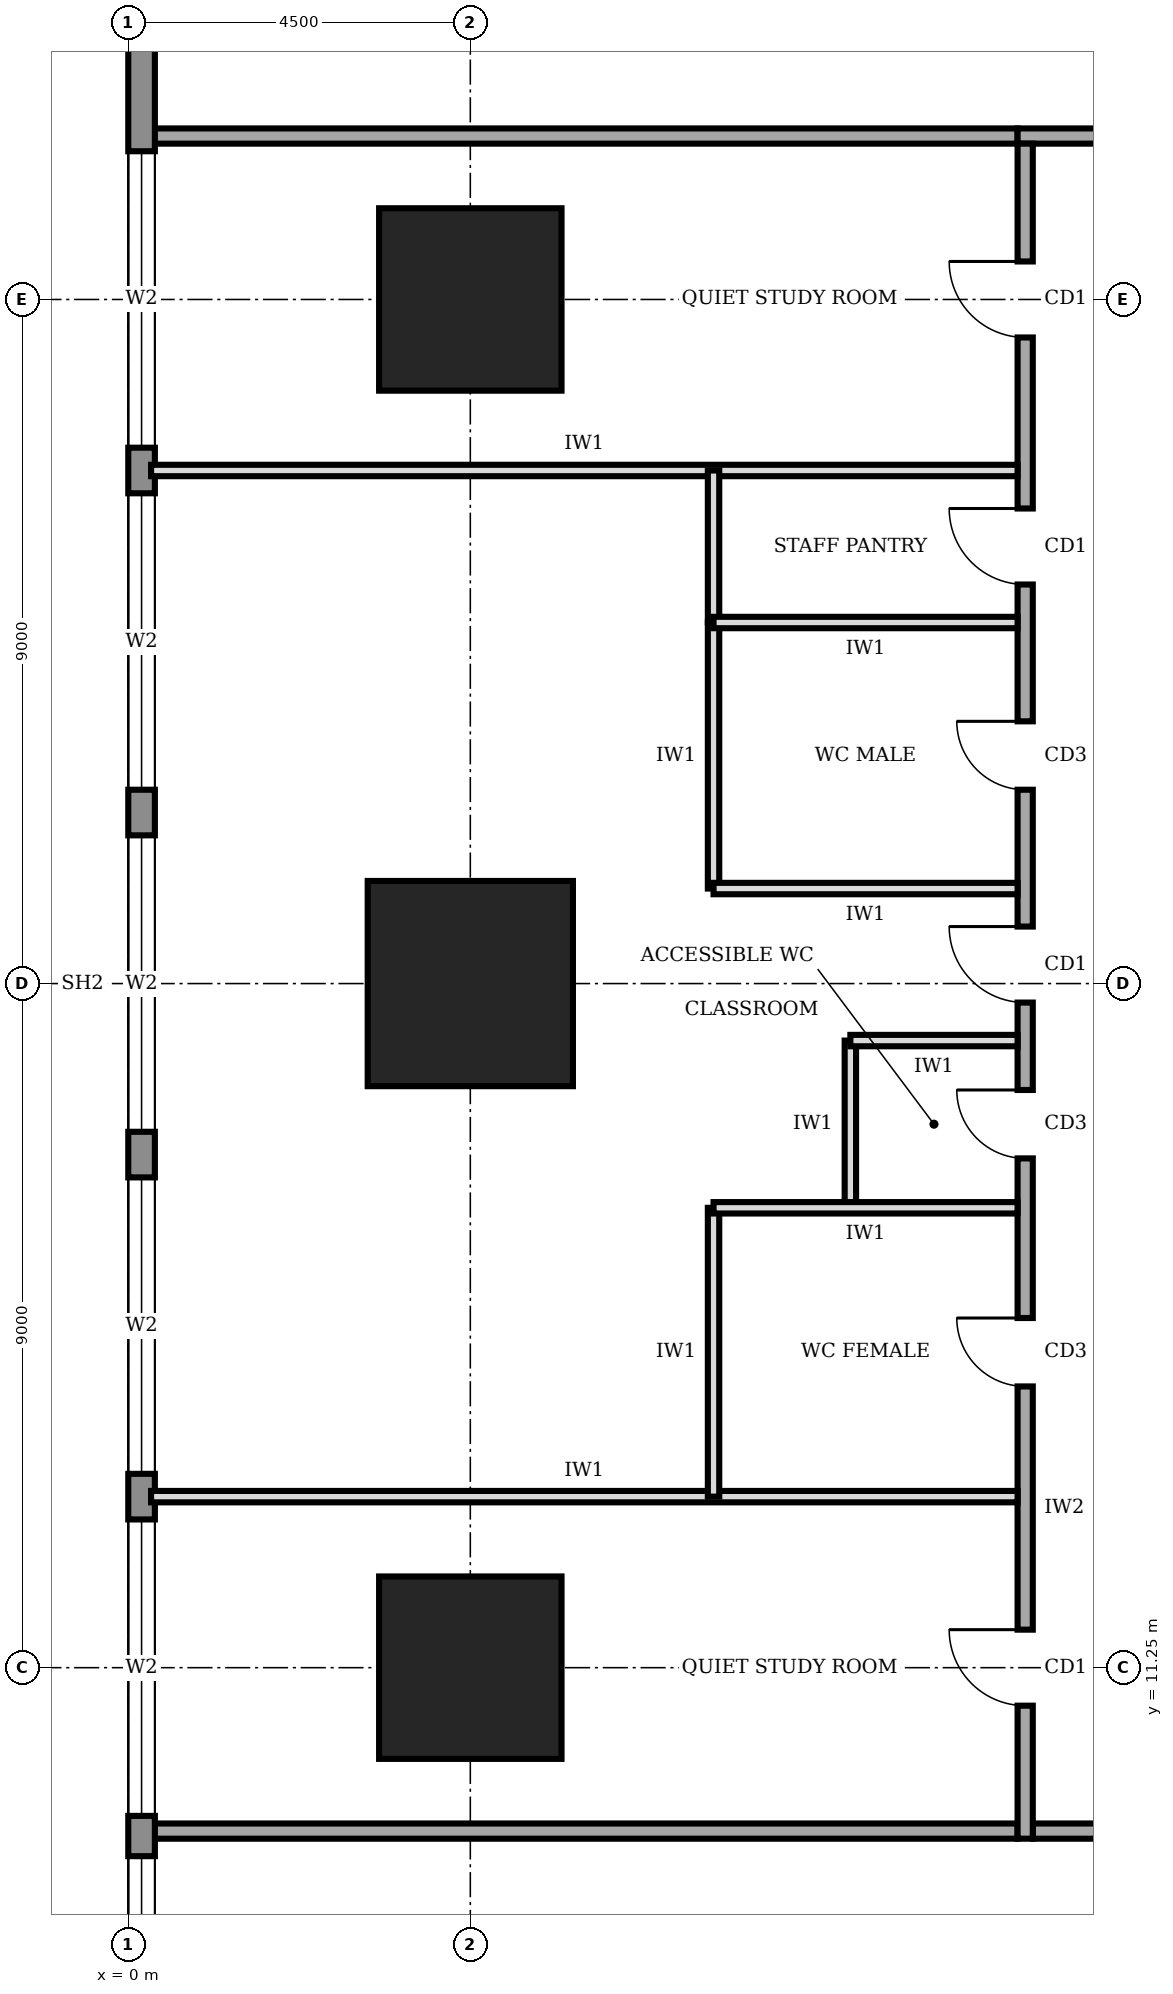
"""IFC4 building model, lengths in metres.
Left out: names, types, materials, properties, quantities, classifications, styles, units other than length and angle.
Written with IfcOpenShell. Run it as: python <this file> out.ifc"""

import sys

from ifc_helpers import new_model, si_unit, direction, frame, frame_2d, origin, origin_2d, place, context, subcontext, project, spatial, rectangle, extrude, element, fill, save


model = new_model("IFC4")
c1 = context("Model", 3, precision=1e-05, world=origin(), true_north=direction((0.0, 1.0)))
c2 = subcontext(c1, "Body", "Model", "MODEL_VIEW")
j1 = project(units=[si_unit("LENGTHUNIT", "METRE"), si_unit("PLANEANGLEUNIT", "RADIAN")], contexts=[c1])
p1 = place(None, origin())
s1 = spatial("IfcSite", under=j1, at=p1, CompositionType="ELEMENT")
p2 = place(p1, origin())
s2 = spatial("IfcBuilding", under=s1, at=p2, CompositionType="ELEMENT")
p3 = place(p2, frame((0.0, 0.0, 69.0)))
s3 = spatial("IfcBuildingStorey", under=s2, at=p3, CompositionType="ELEMENT", Elevation=69.0)
p4 = place(p3, frame((4.5, 11.25, 0.0), z_axis=(0.0, 0.0, 1.0), x_axis=(1.0, 0.0, 0.0)))
e1 = element("IfcColumn", 1, at=p4, inside=s3, PredefinedType="COLUMN", context=c2, shape_type="SweptSolid", body=[
    extrude(rectangle(XDim=2.4, YDim=2.4, at=origin_2d()), origin(), (0.0, 0.0, 1.0), 4.0),
])
p5 = place(p3, frame((4.5, 20.25, 0.0), z_axis=(0.0, 0.0, 1.0), x_axis=(1.0, 0.0, 0.0)))
e2 = element("IfcColumn", 2, at=p5, inside=s3, PredefinedType="COLUMN", context=c2, shape_type="SweptSolid", body=[
    extrude(rectangle(XDim=2.7, YDim=2.7, at=origin_2d()), origin(), (0.0, 0.0, 1.0), 4.0),
])
p6 = place(p3, frame((4.5, 29.25, 0.0), z_axis=(0.0, 0.0, 1.0), x_axis=(1.0, 0.0, 0.0)))
e3 = element("IfcColumn", 3, at=p6, inside=s3, PredefinedType="COLUMN", context=c2, shape_type="SweptSolid", body=[
    extrude(rectangle(XDim=2.4, YDim=2.4, at=origin_2d()), origin(), (0.0, 0.0, 1.0), 4.0),
])
p7 = place(p3, frame((0.175, 35.98, 0.0), z_axis=(0.0, 0.0, 1.0), x_axis=(0.0, -1.0, 0.0)))
e4 = element("IfcWall", 4, at=p7, inside=s3, PredefinedType="STANDARD", context=c2, shape_type="SweptSolid", body=[
    extrude(rectangle(XDim=31.46, YDim=0.35, at=frame_2d((15.73, 0.0))), origin(), (0.0, 0.0, 1.0), 3.75),
])
p8 = place(p7, frame((27.21, 0.0, 0.6)))
e5 = element("IfcOpeningElement", 5, at=p8, cuts=e4, PredefinedType="OPENING", context=c2, shape_type="SweptSolid", body=[
    extrude(rectangle(XDim=3.9, YDim=2.6, at=frame_2d((1.95, 1.3))), frame((0.0, 0.185, 0.0), z_axis=(0.0, -1.0, 0.0), x_axis=(1.0, 0.0, 0.0)), (0.0, 0.0, 1.0), 0.37),
])
p9 = place(p7, frame((22.78, 0.0, 0.6)))
e6 = element("IfcOpeningElement", 6, at=p9, cuts=e4, PredefinedType="OPENING", context=c2, shape_type="SweptSolid", body=[
    extrude(rectangle(XDim=3.9, YDim=2.6, at=frame_2d((1.95, 1.3))), frame((0.0, 0.185, 0.0), z_axis=(0.0, -1.0, 0.0), x_axis=(1.0, 0.0, 0.0)), (0.0, 0.0, 1.0), 0.37),
])
p10 = place(p7, frame((18.28, 0.0, 0.6)))
e7 = element("IfcOpeningElement", 7, at=p10, cuts=e4, PredefinedType="OPENING", context=c2, shape_type="SweptSolid", body=[
    extrude(rectangle(XDim=3.9, YDim=2.6, at=frame_2d((1.95, 1.3))), frame((0.0, 0.185, 0.0), z_axis=(0.0, -1.0, 0.0), x_axis=(1.0, 0.0, 0.0)), (0.0, 0.0, 1.0), 0.37),
])
p11 = place(p7, frame((13.78, 0.0, 0.6)))
e8 = element("IfcOpeningElement", 8, at=p11, cuts=e4, PredefinedType="OPENING", context=c2, shape_type="SweptSolid", body=[
    extrude(rectangle(XDim=3.9, YDim=2.6, at=frame_2d((1.95, 1.3))), frame((0.0, 0.185, 0.0), z_axis=(0.0, -1.0, 0.0), x_axis=(1.0, 0.0, 0.0)), (0.0, 0.0, 1.0), 0.37),
])
p12 = place(p7, frame((9.28, 0.0, 0.6)))
e9 = element("IfcOpeningElement", 9, at=p12, cuts=e4, PredefinedType="OPENING", context=c2, shape_type="SweptSolid", body=[
    extrude(rectangle(XDim=3.9, YDim=2.6, at=frame_2d((1.95, 1.3))), frame((0.0, 0.185, 0.0), z_axis=(0.0, -1.0, 0.0), x_axis=(1.0, 0.0, 0.0)), (0.0, 0.0, 1.0), 0.37),
])
p13 = place(p7, frame((4.78, 0.0, 0.6)))
e10 = element("IfcOpeningElement", 10, at=p13, cuts=e4, PredefinedType="OPENING", context=c2, shape_type="SweptSolid", body=[
    extrude(rectangle(XDim=3.9, YDim=2.6, at=frame_2d((1.95, 1.3))), frame((0.0, 0.185, 0.0), z_axis=(0.0, -1.0, 0.0), x_axis=(1.0, 0.0, 0.0)), (0.0, 0.0, 1.0), 0.37),
])
p14 = place(p3, frame((11.9, 9.1, 0.0), z_axis=(0.0, 0.0, 1.0), x_axis=(1.0, 0.0, 0.0)))
e11 = element("IfcWall", 11, at=p14, inside=s3, PredefinedType="SOLIDWALL", context=c2, shape_type="SweptSolid", body=[
    extrude(rectangle(XDim=18.4, YDim=0.2, at=frame_2d((9.2, 0.0))), origin(), (0.0, 0.0, 1.0), 3.75),
])
p15 = place(p14, frame((2.25, 0.0, 0.0)))
e12 = element("IfcOpeningElement", 12, at=p15, cuts=e11, PredefinedType="OPENING", context=c2, shape_type="SweptSolid", body=[
    extrude(rectangle(XDim=1.4, YDim=2.1, at=frame_2d((0.7, 1.05))), frame((0.0, 0.11, 0.0), z_axis=(0.0, -1.0, 0.0), x_axis=(1.0, 0.0, 0.0)), (0.0, 0.0, 1.0), 0.22),
])
p16 = place(p14, frame((7.85, 0.0, 0.0)))
e13 = element("IfcOpeningElement", 13, at=p16, cuts=e11, PredefinedType="OPENING", context=c2, shape_type="SweptSolid", body=[
    extrude(rectangle(XDim=1.0, YDim=2.1, at=frame_2d((0.5, 1.05))), frame((0.0, 0.11, 0.0), z_axis=(0.0, -1.0, 0.0), x_axis=(1.0, 0.0, 0.0)), (0.0, 0.0, 1.0), 0.22),
])
p17 = place(p14, frame((13.8, 0.0, 0.0)))
e14 = element("IfcOpeningElement", 14, at=p17, cuts=e11, PredefinedType="OPENING", context=c2, shape_type="SweptSolid", body=[
    extrude(rectangle(XDim=1.4, YDim=2.1, at=frame_2d((0.7, 1.05))), frame((0.0, 0.11, 0.0), z_axis=(0.0, -1.0, 0.0), x_axis=(1.0, 0.0, 0.0)), (0.0, 0.0, 1.0), 0.22),
])
p18 = place(p3, frame((30.1, 31.4, 0.0), z_axis=(0.0, 0.0, 1.0), x_axis=(-1.0, 0.0, 0.0)))
e15 = element("IfcWall", 15, at=p18, inside=s3, PredefinedType="SOLIDWALL", context=c2, shape_type="SweptSolid", body=[
    extrude(rectangle(XDim=18.4, YDim=0.2, at=frame_2d((9.2, 0.0))), origin(), (0.0, 0.0, 1.0), 3.75),
])
p19 = place(p18, frame((14.55, 0.0, 0.0)))
e16 = element("IfcOpeningElement", 16, at=p19, cuts=e15, PredefinedType="OPENING", context=c2, shape_type="SweptSolid", body=[
    extrude(rectangle(XDim=1.4, YDim=2.1, at=frame_2d((0.7, 1.05))), frame((0.0, 0.11, 0.0), z_axis=(0.0, -1.0, 0.0), x_axis=(1.0, 0.0, 0.0)), (0.0, 0.0, 1.0), 0.22),
])
p20 = place(p18, frame((7.1, 0.0, 0.0)))
e17 = element("IfcOpeningElement", 17, at=p20, cuts=e15, PredefinedType="OPENING", context=c2, shape_type="SweptSolid", body=[
    extrude(rectangle(XDim=1.0, YDim=2.1, at=frame_2d((0.5, 1.05))), frame((0.0, 0.11, 0.0), z_axis=(0.0, -1.0, 0.0), x_axis=(1.0, 0.0, 0.0)), (0.0, 0.0, 1.0), 0.22),
])
p21 = place(p18, frame((0.55, 0.0, 0.0)))
e18 = element("IfcOpeningElement", 18, at=p21, cuts=e15, PredefinedType="OPENING", context=c2, shape_type="SweptSolid", body=[
    extrude(rectangle(XDim=1.8, YDim=2.1, at=frame_2d((0.9, 1.05))), frame((0.0, 0.11, 0.0), z_axis=(0.0, -1.0, 0.0), x_axis=(1.0, 0.0, 0.0)), (0.0, 0.0, 1.0), 0.22),
])
p22 = place(p3, frame((11.8, 31.3, 0.0), z_axis=(0.0, 0.0, 1.0), x_axis=(0.0, -1.0, 0.0)))
e19 = element("IfcWall", 19, at=p22, inside=s3, PredefinedType="SOLIDWALL", context=c2, shape_type="SweptSolid", body=[
    extrude(rectangle(XDim=22.3, YDim=0.2, at=frame_2d((11.15, 0.0))), origin(), (0.0, 0.0, 1.0), 3.75),
])
p23 = place(p22, frame((19.55, 0.0, 0.0)))
e20 = element("IfcOpeningElement", 20, at=p23, cuts=e19, PredefinedType="OPENING", context=c2, shape_type="SweptSolid", body=[
    extrude(rectangle(XDim=1.0, YDim=2.1, at=frame_2d((0.5, 1.05))), frame((0.0, 0.11, 0.0), z_axis=(0.0, -1.0, 0.0), x_axis=(1.0, 0.0, 0.0)), (0.0, 0.0, 1.0), 0.22),
])
p24 = place(p22, frame((15.45, 0.0, 0.0)))
e21 = element("IfcOpeningElement", 21, at=p24, cuts=e19, PredefinedType="OPENING", context=c2, shape_type="SweptSolid", body=[
    extrude(rectangle(XDim=0.9, YDim=2.1, at=frame_2d((0.45, 1.05))), frame((0.0, 0.11, 0.0), z_axis=(0.0, -1.0, 0.0), x_axis=(1.0, 0.0, 0.0)), (0.0, 0.0, 1.0), 0.22),
])
p25 = place(p22, frame((12.45, 0.0, 0.0)))
e22 = element("IfcOpeningElement", 22, at=p25, cuts=e19, PredefinedType="OPENING", context=c2, shape_type="SweptSolid", body=[
    extrude(rectangle(XDim=0.9, YDim=2.1, at=frame_2d((0.45, 1.05))), frame((0.0, 0.11, 0.0), z_axis=(0.0, -1.0, 0.0), x_axis=(1.0, 0.0, 0.0)), (0.0, 0.0, 1.0), 0.22),
])
p26 = place(p22, frame((7.6, 0.0, 0.0)))
e23 = element("IfcOpeningElement", 23, at=p26, cuts=e19, PredefinedType="OPENING", context=c2, shape_type="SweptSolid", body=[
    extrude(rectangle(XDim=0.9, YDim=2.1, at=frame_2d((0.45, 1.05))), frame((0.0, 0.11, 0.0), z_axis=(0.0, -1.0, 0.0), x_axis=(1.0, 0.0, 0.0)), (0.0, 0.0, 1.0), 0.22),
])
p27 = place(p22, frame((4.8, 0.0, 0.0)))
e24 = element("IfcOpeningElement", 24, at=p27, cuts=e19, PredefinedType="OPENING", context=c2, shape_type="SweptSolid", body=[
    extrude(rectangle(XDim=1.0, YDim=2.1, at=frame_2d((0.5, 1.05))), frame((0.0, 0.11, 0.0), z_axis=(0.0, -1.0, 0.0), x_axis=(1.0, 0.0, 0.0)), (0.0, 0.0, 1.0), 0.22),
])
p28 = place(p22, frame((10.3, 0.0, 0.0)))
e25 = element("IfcOpeningElement", 25, at=p28, cuts=e19, PredefinedType="OPENING", context=c2, shape_type="SweptSolid", body=[
    extrude(rectangle(XDim=1.0, YDim=2.1, at=frame_2d((0.5, 1.05))), frame((0.0, 0.11, 0.0), z_axis=(0.0, -1.0, 0.0), x_axis=(1.0, 0.0, 0.0)), (0.0, 0.0, 1.0), 0.22),
])
p29 = place(p22, frame((1.55, 0.0, 0.0)))
e26 = element("IfcOpeningElement", 26, at=p29, cuts=e19, PredefinedType="OPENING", context=c2, shape_type="SweptSolid", body=[
    extrude(rectangle(XDim=1.0, YDim=2.1, at=frame_2d((0.5, 1.05))), frame((0.0, 0.11, 0.0), z_axis=(0.0, -1.0, 0.0), x_axis=(1.0, 0.0, 0.0)), (0.0, 0.0, 1.0), 0.22),
])
for number, where, z_axis, x_axis in (
    (27, (0.3, 9.1, 0.0), (0.0, 0.0, 1.0), (1.0, 0.0, 0.0)),
    (28, (0.3, 31.4, 0.0), (0.0, 0.0, 1.0), (1.0, 0.0, 0.0)),
):
    element("IfcWall", number, at=place(p3, frame(where, z_axis=z_axis, x_axis=x_axis)), inside=s3, PredefinedType="SOLIDWALL", context=c2, shape_type="SweptSolid", body=[
        extrude(rectangle(XDim=11.4, YDim=0.2, at=frame_2d((5.7, 0.0))), origin(), (0.0, 0.0, 1.0), 3.75),
    ])
for number, where, z_axis, x_axis in (
    (29, (0.3, 13.5, 0.0), (0.0, 0.0, 1.0), (1.0, 0.0, 0.0)),
    (30, (0.3, 27.0, 0.0), (0.0, 0.0, 1.0), (1.0, 0.0, 0.0)),
):
    element("IfcWall", number, at=place(p3, frame(where, z_axis=z_axis, x_axis=x_axis)), inside=s3, PredefinedType="PARTITIONING", context=c2, shape_type="SweptSolid", body=[
        extrude(rectangle(XDim=11.4, YDim=0.15, at=frame_2d((5.7, 0.0))), origin(), (0.0, 0.0, 1.0), 3.75),
    ])
p30 = place(p3, frame((11.7, 17.3, 0.0), z_axis=(0.0, 0.0, 1.0), x_axis=(-1.0, 0.0, 0.0)))
e31 = element("IfcWall", 31, at=p30, inside=s3, PredefinedType="PARTITIONING", context=c2, shape_type="SweptSolid", body=[
    extrude(rectangle(XDim=4.0, YDim=0.15, at=frame_2d((2.0, 0.0))), origin(), (0.0, 0.0, 1.0), 3.75),
])
p31 = place(p3, frame((11.7, 19.5, 0.0), z_axis=(0.0, 0.0, 1.0), x_axis=(-1.0, 0.0, 0.0)))
e32 = element("IfcWall", 32, at=p31, inside=s3, PredefinedType="PARTITIONING", context=c2, shape_type="SweptSolid", body=[
    extrude(rectangle(XDim=2.2, YDim=0.15, at=frame_2d((1.1, 0.0))), origin(), (0.0, 0.0, 1.0), 2.85),
])
for number, where, z_axis, x_axis in (
    (33, (11.7, 21.5, 0.0), (0.0, 0.0, 1.0), (-1.0, 0.0, 0.0)),
    (34, (11.7, 25.0, 0.0), (0.0, 0.0, 1.0), (-1.0, 0.0, 0.0)),
):
    element("IfcWall", number, at=place(p3, frame(where, z_axis=z_axis, x_axis=x_axis)), inside=s3, PredefinedType="PARTITIONING", context=c2, shape_type="SweptSolid", body=[
        extrude(rectangle(XDim=4.0, YDim=0.15, at=frame_2d((2.0, 0.0))), origin(), (0.0, 0.0, 1.0), 3.75),
    ])
p32 = place(p3, frame((7.7, 13.5, 0.0), z_axis=(0.0, 0.0, 1.0), x_axis=(0.0, 1.0, 0.0)))
e35 = element("IfcWall", 35, at=p32, inside=s3, PredefinedType="PARTITIONING", context=c2, shape_type="SweptSolid", body=[
    extrude(rectangle(XDim=3.8, YDim=0.15, at=frame_2d((1.9, 0.0))), origin(), (0.0, 0.0, 1.0), 3.75),
])
p33 = place(p3, frame((9.5, 17.3, 0.0), z_axis=(0.0, 0.0, 1.0), x_axis=(0.0, 1.0, 0.0)))
e36 = element("IfcWall", 36, at=p33, inside=s3, PredefinedType="PARTITIONING", context=c2, shape_type="SweptSolid", body=[
    extrude(rectangle(XDim=2.2, YDim=0.15, at=frame_2d((1.1, 0.0))), origin(), (0.0, 0.0, 1.0), 3.75),
])
p34 = place(p3, frame((7.7, 21.5, 0.0), z_axis=(0.0, 0.0, 1.0), x_axis=(0.0, 1.0, 0.0)))
e37 = element("IfcWall", 37, at=p34, inside=s3, PredefinedType="PARTITIONING", context=c2, shape_type="SweptSolid", body=[
    extrude(rectangle(XDim=3.5, YDim=0.15, at=frame_2d((1.75, 0.0))), origin(), (0.0, 0.0, 1.0), 3.75),
])
p35 = place(p3, frame((7.7, 25.0, 0.0), z_axis=(0.0, 0.0, 1.0), x_axis=(0.0, 1.0, 0.0)))
e38 = element("IfcWall", 38, at=p35, inside=s3, PredefinedType="PARTITIONING", context=c2, shape_type="SweptSolid", body=[
    extrude(rectangle(XDim=2.0, YDim=0.15, at=frame_2d((1.0, 0.0))), origin(), (0.0, 0.0, 1.0), 3.75),
])
p36 = place(p8, origin())
e39 = element("IfcWindow", 39, at=p36, inside=s3, PartitioningType="SINGLE_PANEL", PredefinedType="WINDOW", context=c2, shape_type="SweptSolid", body=[
    extrude(rectangle(XDim=3.9, YDim=2.6, at=frame_2d((1.95, 1.3))), frame((0.0, 0.03, 0.0), z_axis=(0.0, -1.0, 0.0), x_axis=(1.0, 0.0, 0.0)), (0.0, 0.0, 1.0), 0.06),
])
fill(e5, e39)
p37 = place(p9, origin())
e40 = element("IfcWindow", 40, at=p37, inside=s3, PartitioningType="SINGLE_PANEL", PredefinedType="WINDOW", context=c2, shape_type="SweptSolid", body=[
    extrude(rectangle(XDim=3.9, YDim=2.6, at=frame_2d((1.95, 1.3))), frame((0.0, 0.03, 0.0), z_axis=(0.0, -1.0, 0.0), x_axis=(1.0, 0.0, 0.0)), (0.0, 0.0, 1.0), 0.06),
])
fill(e6, e40)
p38 = place(p10, origin())
e41 = element("IfcWindow", 41, at=p38, inside=s3, PartitioningType="SINGLE_PANEL", PredefinedType="WINDOW", context=c2, shape_type="SweptSolid", body=[
    extrude(rectangle(XDim=3.9, YDim=2.6, at=frame_2d((1.95, 1.3))), frame((0.0, 0.03, 0.0), z_axis=(0.0, -1.0, 0.0), x_axis=(1.0, 0.0, 0.0)), (0.0, 0.0, 1.0), 0.06),
])
fill(e7, e41)
p39 = place(p11, origin())
e42 = element("IfcWindow", 42, at=p39, inside=s3, PartitioningType="SINGLE_PANEL", PredefinedType="WINDOW", context=c2, shape_type="SweptSolid", body=[
    extrude(rectangle(XDim=3.9, YDim=2.6, at=frame_2d((1.95, 1.3))), frame((0.0, 0.03, 0.0), z_axis=(0.0, -1.0, 0.0), x_axis=(1.0, 0.0, 0.0)), (0.0, 0.0, 1.0), 0.06),
])
fill(e8, e42)
p40 = place(p12, origin())
e43 = element("IfcWindow", 43, at=p40, inside=s3, PartitioningType="SINGLE_PANEL", PredefinedType="WINDOW", context=c2, shape_type="SweptSolid", body=[
    extrude(rectangle(XDim=3.9, YDim=2.6, at=frame_2d((1.95, 1.3))), frame((0.0, 0.03, 0.0), z_axis=(0.0, -1.0, 0.0), x_axis=(1.0, 0.0, 0.0)), (0.0, 0.0, 1.0), 0.06),
])
fill(e9, e43)
p41 = place(p13, origin())
e44 = element("IfcWindow", 44, at=p41, inside=s3, PartitioningType="SINGLE_PANEL", PredefinedType="WINDOW", context=c2, shape_type="SweptSolid", body=[
    extrude(rectangle(XDim=3.9, YDim=2.6, at=frame_2d((1.95, 1.3))), frame((0.0, 0.03, 0.0), z_axis=(0.0, -1.0, 0.0), x_axis=(1.0, 0.0, 0.0)), (0.0, 0.0, 1.0), 0.06),
])
fill(e10, e44)
p42 = place(p23, frame((1.0, 0.0, 0.0), z_axis=(0.0, 0.0, 1.0), x_axis=(-1.0, 0.0, 0.0)))
e45 = element("IfcDoor", 45, at=p42, inside=s3, OperationType="SINGLE_SWING_RIGHT", PredefinedType="DOOR", context=c2, shape_type="SweptSolid", body=[
    extrude(rectangle(XDim=1.0, YDim=2.1, at=frame_2d((0.5, 1.05))), frame((0.0, 0.025, 0.0), z_axis=(0.0, -1.0, 0.0), x_axis=(1.0, 0.0, 0.0)), (0.0, 0.0, 1.0), 0.05),
])
fill(e20, e45)
p43 = place(p24, frame((0.9, 0.0, 0.0), z_axis=(0.0, 0.0, 1.0), x_axis=(-1.0, 0.0, 0.0)))
e46 = element("IfcDoor", 46, at=p43, inside=s3, OperationType="SINGLE_SWING_RIGHT", PredefinedType="DOOR", context=c2, shape_type="SweptSolid", body=[
    extrude(rectangle(XDim=0.9, YDim=2.1, at=frame_2d((0.45, 1.05))), frame((0.0, 0.025, 0.0), z_axis=(0.0, -1.0, 0.0), x_axis=(1.0, 0.0, 0.0)), (0.0, 0.0, 1.0), 0.05),
])
fill(e21, e46)
p44 = place(p25, frame((0.9, 0.0, 0.0), z_axis=(0.0, 0.0, 1.0), x_axis=(-1.0, 0.0, 0.0)))
e47 = element("IfcDoor", 47, at=p44, inside=s3, OperationType="SINGLE_SWING_RIGHT", PredefinedType="DOOR", context=c2, shape_type="SweptSolid", body=[
    extrude(rectangle(XDim=0.9, YDim=2.1, at=frame_2d((0.45, 1.05))), frame((0.0, 0.025, 0.0), z_axis=(0.0, -1.0, 0.0), x_axis=(1.0, 0.0, 0.0)), (0.0, 0.0, 1.0), 0.05),
])
fill(e22, e47)
p45 = place(p26, frame((0.9, 0.0, 0.0), z_axis=(0.0, 0.0, 1.0), x_axis=(-1.0, 0.0, 0.0)))
e48 = element("IfcDoor", 48, at=p45, inside=s3, OperationType="SINGLE_SWING_RIGHT", PredefinedType="DOOR", context=c2, shape_type="SweptSolid", body=[
    extrude(rectangle(XDim=0.9, YDim=2.1, at=frame_2d((0.45, 1.05))), frame((0.0, 0.025, 0.0), z_axis=(0.0, -1.0, 0.0), x_axis=(1.0, 0.0, 0.0)), (0.0, 0.0, 1.0), 0.05),
])
fill(e23, e48)
p46 = place(p27, frame((1.0, 0.0, 0.0), z_axis=(0.0, 0.0, 1.0), x_axis=(-1.0, 0.0, 0.0)))
e49 = element("IfcDoor", 49, at=p46, inside=s3, OperationType="SINGLE_SWING_RIGHT", PredefinedType="DOOR", context=c2, shape_type="SweptSolid", body=[
    extrude(rectangle(XDim=1.0, YDim=2.1, at=frame_2d((0.5, 1.05))), frame((0.0, 0.025, 0.0), z_axis=(0.0, -1.0, 0.0), x_axis=(1.0, 0.0, 0.0)), (0.0, 0.0, 1.0), 0.05),
])
fill(e24, e49)
p47 = place(p28, frame((1.0, 0.0, 0.0), z_axis=(0.0, 0.0, 1.0), x_axis=(-1.0, 0.0, 0.0)))
e50 = element("IfcDoor", 50, at=p47, inside=s3, OperationType="SINGLE_SWING_RIGHT", PredefinedType="DOOR", context=c2, shape_type="SweptSolid", body=[
    extrude(rectangle(XDim=1.0, YDim=2.1, at=frame_2d((0.5, 1.05))), frame((0.0, 0.025, 0.0), z_axis=(0.0, -1.0, 0.0), x_axis=(1.0, 0.0, 0.0)), (0.0, 0.0, 1.0), 0.05),
])
fill(e25, e50)
p48 = place(p29, frame((1.0, 0.0, 0.0), z_axis=(0.0, 0.0, 1.0), x_axis=(-1.0, 0.0, 0.0)))
e51 = element("IfcDoor", 51, at=p48, inside=s3, OperationType="SINGLE_SWING_RIGHT", PredefinedType="DOOR", context=c2, shape_type="SweptSolid", body=[
    extrude(rectangle(XDim=1.0, YDim=2.1, at=frame_2d((0.5, 1.05))), frame((0.0, 0.025, 0.0), z_axis=(0.0, -1.0, 0.0), x_axis=(1.0, 0.0, 0.0)), (0.0, 0.0, 1.0), 0.05),
])
fill(e26, e51)
save(model, sys.argv[1])
